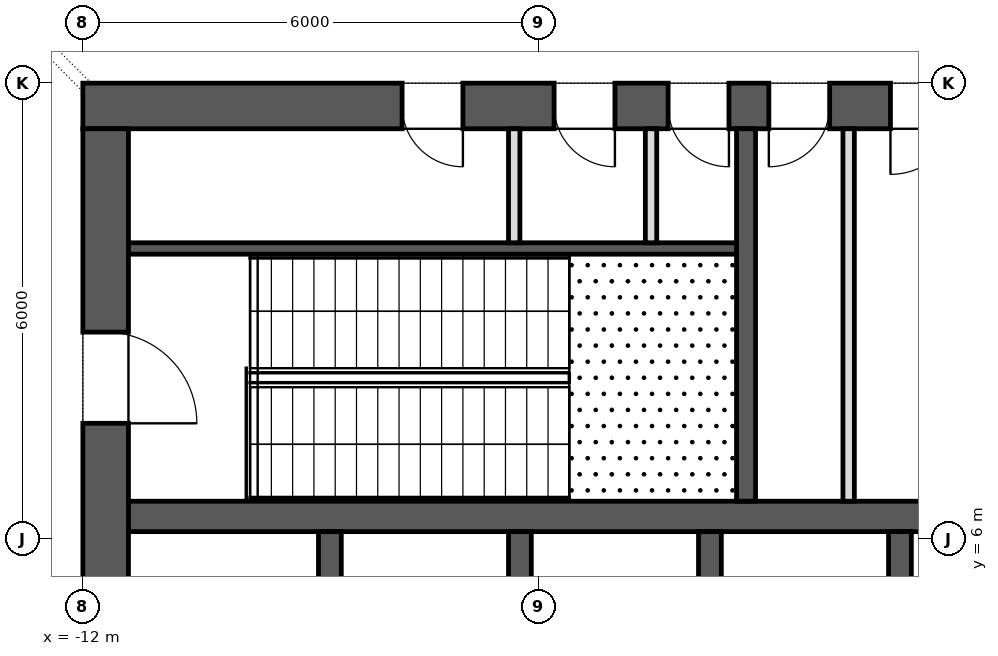
"""IFC4 building model, lengths in metres.
Left out: names, types, materials, properties, quantities, classifications, styles, units other than length and angle.
Written with IfcOpenShell. Run it as: python <this file> out.ifc"""

import sys

from ifc_helpers import new_model, si_unit, direction, frame, frame_2d, origin, place, context, subcontext, project, spatial, rectangle, extrude, element, fill, save


model = new_model("IFC4")
c1 = context("Model", 3, precision=1e-05, world=origin(), true_north=direction((0.0, 1.0)))
c2 = subcontext(c1, "Body", "Model", "MODEL_VIEW")
j1 = project(units=[si_unit("LENGTHUNIT", "METRE"), si_unit("PLANEANGLEUNIT", "RADIAN")], contexts=[c1])
p1 = place(None, origin())
s1 = spatial("IfcSite", under=j1, at=p1, CompositionType="ELEMENT")
p2 = place(p1, origin())
s2 = spatial("IfcBuilding", under=s1, at=p2, CompositionType="ELEMENT")
p3 = place(p2, frame((0.0, 0.0, 12.5)))
s3 = spatial("IfcBuildingStorey", under=s2, at=p3, CompositionType="ELEMENT", Elevation=12.5)
p4 = place(p3, frame((-12.0, 11.7, 0.0), z_axis=(0.0, 0.0, 1.0), x_axis=(1.0, 0.0, 0.0)))
e1 = element("IfcWall", 1, at=p4, inside=s3, PredefinedType="SHEAR", context=c2, shape_type="SweptSolid", body=[
    extrude(rectangle(XDim=24.0, YDim=0.6, at=frame_2d((12.0, 0.0))), origin(), (0.0, 0.0, 1.0), 5.5),
])
p5 = place(p4, frame((9.025, 0.0, 0.0)))
e2 = element("IfcOpeningElement", 2, at=p5, cuts=e1, PredefinedType="OPENING", context=c2, shape_type="SweptSolid", body=[
    extrude(rectangle(XDim=0.8, YDim=2.1, at=frame_2d((0.4, 1.05))), frame((0.0, 0.312, 0.0), z_axis=(0.0, -1.0, 0.0), x_axis=(1.0, 0.0, 0.0)), (0.0, 0.0, 1.0), 0.624),
])
p6 = place(p4, frame((10.625, 0.0, 0.0)))
e3 = element("IfcOpeningElement", 3, at=p6, cuts=e1, PredefinedType="OPENING", context=c2, shape_type="SweptSolid", body=[
    extrude(rectangle(XDim=0.9, YDim=2.1, at=frame_2d((0.45, 1.05))), frame((0.0, 0.312, 0.0), z_axis=(0.0, -1.0, 0.0), x_axis=(1.0, 0.0, 0.0)), (0.0, 0.0, 1.0), 0.624),
])
p7 = place(p4, frame((4.2, 0.0, 0.0)))
e4 = element("IfcOpeningElement", 4, at=p7, cuts=e1, PredefinedType="OPENING", context=c2, shape_type="SweptSolid", body=[
    extrude(rectangle(XDim=0.8, YDim=2.1, at=frame_2d((0.4, 1.05))), frame((0.0, 0.312, 0.0), z_axis=(0.0, -1.0, 0.0), x_axis=(1.0, 0.0, 0.0)), (0.0, 0.0, 1.0), 0.624),
])
p8 = place(p4, frame((6.2, 0.0, 0.0)))
e5 = element("IfcOpeningElement", 5, at=p8, cuts=e1, PredefinedType="OPENING", context=c2, shape_type="SweptSolid", body=[
    extrude(rectangle(XDim=0.8, YDim=2.1, at=frame_2d((0.4, 1.05))), frame((0.0, 0.312, 0.0), z_axis=(0.0, -1.0, 0.0), x_axis=(1.0, 0.0, 0.0)), (0.0, 0.0, 1.0), 0.624),
])
p9 = place(p4, frame((7.7, 0.0, 0.0)))
e6 = element("IfcOpeningElement", 6, at=p9, cuts=e1, PredefinedType="OPENING", context=c2, shape_type="SweptSolid", body=[
    extrude(rectangle(XDim=0.8, YDim=2.1, at=frame_2d((0.4, 1.05))), frame((0.0, 0.312, 0.0), z_axis=(0.0, -1.0, 0.0), x_axis=(1.0, 0.0, 0.0)), (0.0, 0.0, 1.0), 0.624),
])
p10 = place(p4, frame((15.85, 0.0, 0.0)))
e7 = element("IfcOpeningElement", 7, at=p10, cuts=e1, PredefinedType="OPENING", context=c2, shape_type="SweptSolid", body=[
    extrude(rectangle(XDim=0.8, YDim=2.1, at=frame_2d((0.4, 1.05))), frame((0.0, 0.312, 0.0), z_axis=(0.0, -1.0, 0.0), x_axis=(1.0, 0.0, 0.0)), (0.0, 0.0, 1.0), 0.624),
])
p11 = place(p3, frame((-11.7, -11.4, 0.0), z_axis=(0.0, 0.0, 1.0), x_axis=(0.0, 1.0, 0.0)))
e8 = element("IfcWall", 8, at=p11, inside=s3, PredefinedType="SHEAR", context=c2, shape_type="SweptSolid", body=[
    extrude(rectangle(XDim=22.8, YDim=0.6, at=frame_2d((11.4, 0.0))), origin(), (0.0, 0.0, 1.0), 5.5),
])
p12 = place(p11, frame((10.2, 0.0, 0.0)))
e9 = element("IfcOpeningElement", 9, at=p12, cuts=e8, PredefinedType="OPENING", context=c2, shape_type="SweptSolid", body=[
    extrude(rectangle(XDim=2.4, YDim=2.1, at=frame_2d((1.2, 1.05))), frame((0.0, 0.312, 0.0), z_axis=(0.0, -1.0, 0.0), x_axis=(1.0, 0.0, 0.0)), (0.0, 0.0, 1.0), 0.624),
])
p13 = place(p11, frame((18.925, 0.0, 0.0)))
e10 = element("IfcOpeningElement", 10, at=p13, cuts=e8, PredefinedType="OPENING", context=c2, shape_type="SweptSolid", body=[
    extrude(rectangle(XDim=1.2, YDim=2.1, at=frame_2d((0.6, 1.05))), frame((0.0, 0.312, 0.0), z_axis=(0.0, -1.0, 0.0), x_axis=(1.0, 0.0, 0.0)), (0.0, 0.0, 1.0), 0.624),
])
p14 = place(p11, frame((2.675, 0.0, 0.0)))
e11 = element("IfcOpeningElement", 11, at=p14, cuts=e8, PredefinedType="OPENING", context=c2, shape_type="SweptSolid", body=[
    extrude(rectangle(XDim=1.2, YDim=2.1, at=frame_2d((0.6, 1.05))), frame((0.0, 0.312, 0.0), z_axis=(0.0, -1.0, 0.0), x_axis=(1.0, 0.0, 0.0)), (0.0, 0.0, 1.0), 0.624),
])
p15 = place(p3, frame((-11.4, 6.3, 0.0), z_axis=(0.0, 0.0, 1.0), x_axis=(1.0, 0.0, 0.0)))
e12 = element("IfcWall", 12, at=p15, inside=s3, PredefinedType="SHEAR", context=c2, shape_type="SweptSolid", body=[
    extrude(rectangle(XDim=22.8, YDim=0.4, at=frame_2d((11.4, 0.0))), origin(), (0.0, 0.0, 1.0), 5.5),
])
p16 = place(p15, frame((20.85, 0.0, 0.0)))
e13 = element("IfcOpeningElement", 13, at=p16, cuts=e12, PredefinedType="OPENING", context=c2, shape_type="SweptSolid", body=[
    extrude(rectangle(XDim=1.1, YDim=2.1, at=frame_2d((0.55, 1.05))), frame((0.0, 0.212, 0.0), z_axis=(0.0, -1.0, 0.0), x_axis=(1.0, 0.0, 0.0)), (0.0, 0.0, 1.0), 0.424),
])
for number, where, z_axis, x_axis in (
    (14, (-8.75, 3.2, 0.0), (0.0, 0.0, 1.0), (0.0, 1.0, 0.0)),
    (15, (-6.25, 3.2, 0.0), (0.0, 0.0, 1.0), (0.0, 1.0, 0.0)),
    (16, (-3.75, 3.2, 0.0), (0.0, 0.0, 1.0), (0.0, 1.0, 0.0)),
    (17, (-1.25, 3.2, 0.0), (0.0, 0.0, 1.0), (0.0, 1.0, 0.0)),
):
    element("IfcWall", number, at=place(p3, frame(where, z_axis=z_axis, x_axis=x_axis)), inside=s3, PredefinedType="SHEAR", context=c2, shape_type="SweptSolid", body=[
        extrude(rectangle(XDim=2.9, YDim=0.3, at=frame_2d((1.45, 0.0))), origin(), (0.0, 0.0, 1.0), 5.5),
    ])
p17 = place(p3, frame((-3.275, 6.5, 0.0), z_axis=(0.0, 0.0, 1.0), x_axis=(0.0, 1.0, 0.0)))
e18 = element("IfcWall", 18, at=p17, inside=s3, PredefinedType="SHEAR", context=c2, shape_type="SweptSolid", body=[
    extrude(rectangle(XDim=4.9, YDim=0.25, at=frame_2d((2.45, 0.0))), origin(), (0.0, 0.0, 1.0), 5.15),
])
p18 = place(p3, frame((-11.4, 9.825, 0.0), z_axis=(0.0, 0.0, 1.0), x_axis=(1.0, 0.0, 0.0)))
e19 = element("IfcWall", 19, at=p18, inside=s3, PredefinedType="SHEAR", context=c2, shape_type="SweptSolid", body=[
    extrude(rectangle(XDim=8.0, YDim=0.15, at=frame_2d((4.0, 0.0))), origin(), (0.0, 0.0, 1.0), 5.15),
])
p19 = place(p3, frame((-1.925, 6.5, 0.0), z_axis=(0.0, 0.0, 1.0), x_axis=(0.0, 1.0, 0.0)))
e20 = element("IfcWall", 20, at=p19, inside=s3, PredefinedType="PARTITIONING", context=c2, shape_type="SweptSolid", body=[
    extrude(rectangle(XDim=4.9, YDim=0.15, at=frame_2d((2.45, 0.0))), origin(), (0.0, 0.0, 1.0), 5.15),
])
for number, where, z_axis, x_axis in (
    (21, (-6.325, 9.9, 0.0), (0.0, 0.0, 1.0), (0.0, 1.0, 0.0)),
    (22, (-4.525, 9.9, 0.0), (0.0, 0.0, 1.0), (0.0, 1.0, 0.0)),
):
    element("IfcWall", number, at=place(p3, frame(where, z_axis=z_axis, x_axis=x_axis)), inside=s3, PredefinedType="PARTITIONING", context=c2, shape_type="SweptSolid", body=[
        extrude(rectangle(XDim=1.5, YDim=0.15, at=frame_2d((0.75, 0.0))), origin(), (0.0, 0.0, 1.0), 5.15),
    ])
p20 = place(p13, frame((1.2, 0.0, 0.0), z_axis=(0.0, 0.0, 1.0), x_axis=(-1.0, 0.0, 0.0)))
e23 = element("IfcDoor", 23, at=p20, inside=s3, OperationType="SINGLE_SWING_LEFT", PredefinedType="DOOR", context=c2, shape_type="SweptSolid", body=[
    extrude(rectangle(XDim=1.2, YDim=2.1, at=frame_2d((0.6, 1.05))), frame((0.0, 0.025, 0.0), z_axis=(0.0, -1.0, 0.0), x_axis=(1.0, 0.0, 0.0)), (0.0, 0.0, 1.0), 0.05),
])
fill(e10, e23)
p21 = place(p5, frame((0.8, 0.0, 0.0), z_axis=(0.0, 0.0, 1.0), x_axis=(-1.0, 0.0, 0.0)))
e24 = element("IfcDoor", 24, at=p21, inside=s3, OperationType="SINGLE_SWING_LEFT", PredefinedType="DOOR", context=c2, shape_type="SweptSolid", body=[
    extrude(rectangle(XDim=0.8, YDim=2.1, at=frame_2d((0.4, 1.05))), frame((0.0, 0.025, 0.0), z_axis=(0.0, -1.0, 0.0), x_axis=(1.0, 0.0, 0.0)), (0.0, 0.0, 1.0), 0.05),
])
fill(e2, e24)
p22 = place(p6, frame((0.9, 0.0, 0.0), z_axis=(0.0, 0.0, 1.0), x_axis=(-1.0, 0.0, 0.0)))
e25 = element("IfcDoor", 25, at=p22, inside=s3, OperationType="SINGLE_SWING_LEFT", PredefinedType="DOOR", context=c2, shape_type="SweptSolid", body=[
    extrude(rectangle(XDim=0.9, YDim=2.1, at=frame_2d((0.45, 1.05))), frame((0.0, 0.025, 0.0), z_axis=(0.0, -1.0, 0.0), x_axis=(1.0, 0.0, 0.0)), (0.0, 0.0, 1.0), 0.05),
])
fill(e3, e25)
p23 = place(p7, frame((0.8, 0.0, 0.0), z_axis=(0.0, 0.0, 1.0), x_axis=(-1.0, 0.0, 0.0)))
e26 = element("IfcDoor", 26, at=p23, inside=s3, OperationType="SINGLE_SWING_RIGHT", PredefinedType="DOOR", context=c2, shape_type="SweptSolid", body=[
    extrude(rectangle(XDim=0.8, YDim=2.1, at=frame_2d((0.4, 1.05))), frame((0.0, 0.025, 0.0), z_axis=(0.0, -1.0, 0.0), x_axis=(1.0, 0.0, 0.0)), (0.0, 0.0, 1.0), 0.05),
])
fill(e4, e26)
p24 = place(p8, frame((0.8, 0.0, 0.0), z_axis=(0.0, 0.0, 1.0), x_axis=(-1.0, 0.0, 0.0)))
e27 = element("IfcDoor", 27, at=p24, inside=s3, OperationType="SINGLE_SWING_RIGHT", PredefinedType="DOOR", context=c2, shape_type="SweptSolid", body=[
    extrude(rectangle(XDim=0.8, YDim=2.1, at=frame_2d((0.4, 1.05))), frame((0.0, 0.025, 0.0), z_axis=(0.0, -1.0, 0.0), x_axis=(1.0, 0.0, 0.0)), (0.0, 0.0, 1.0), 0.05),
])
fill(e5, e27)
p25 = place(p9, frame((0.8, 0.0, 0.0), z_axis=(0.0, 0.0, 1.0), x_axis=(-1.0, 0.0, 0.0)))
e28 = element("IfcDoor", 28, at=p25, inside=s3, OperationType="SINGLE_SWING_RIGHT", PredefinedType="DOOR", context=c2, shape_type="SweptSolid", body=[
    extrude(rectangle(XDim=0.8, YDim=2.1, at=frame_2d((0.4, 1.05))), frame((0.0, 0.025, 0.0), z_axis=(0.0, -1.0, 0.0), x_axis=(1.0, 0.0, 0.0)), (0.0, 0.0, 1.0), 0.05),
])
fill(e6, e28)
save(model, sys.argv[1])
